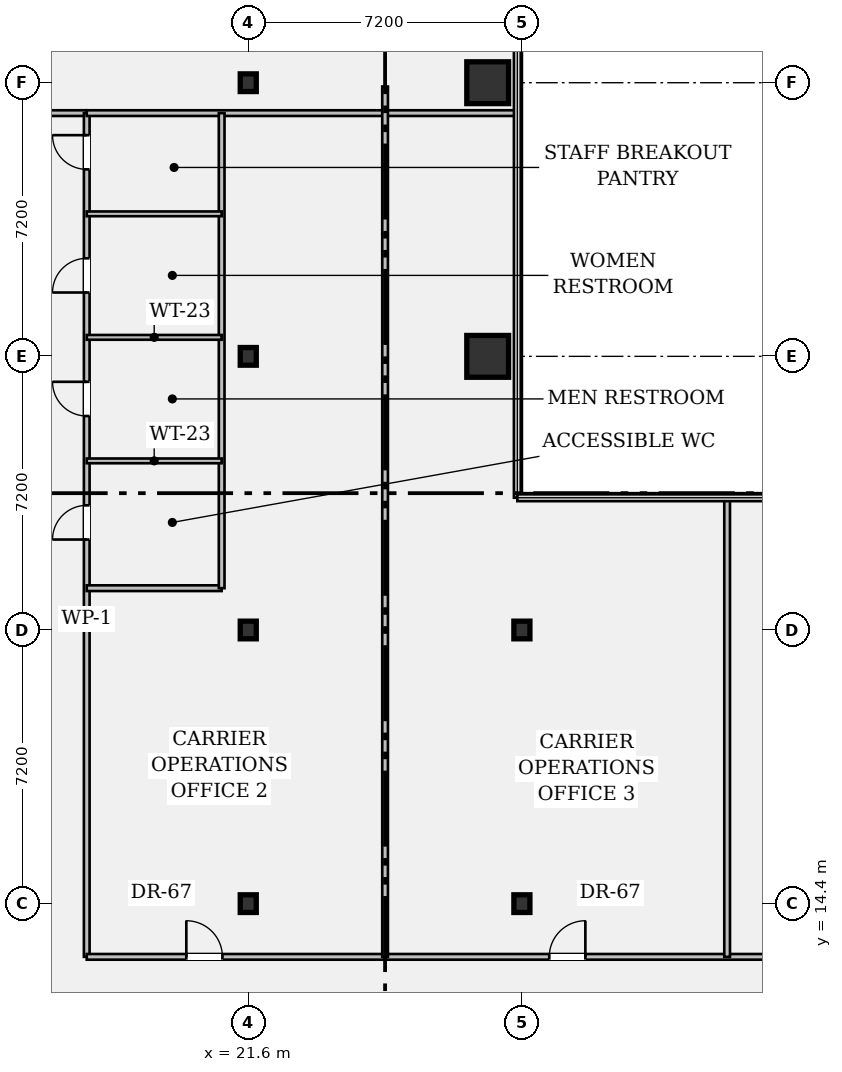
"""IFC4 building model, lengths in metres.
Left out: names, types, materials, properties, quantities, classifications, styles, units other than length and angle.
Written with IfcOpenShell. Run it as: python <this file> out.ifc"""

import sys

from ifc_helpers import new_model, si_unit, direction, frame, frame_2d, origin, origin_2d, place, context, subcontext, project, spatial, rectangle, hollow_rectangle, i_section, extrude, element, fill, save


model = new_model("IFC4")
c1 = context("Model", 3, precision=1e-05, world=origin(), true_north=direction((0.0, 1.0)))
c2 = subcontext(c1, "Body", "Model", "MODEL_VIEW")
j1 = project(units=[si_unit("LENGTHUNIT", "METRE"), si_unit("PLANEANGLEUNIT", "RADIAN")], contexts=[c1])
p1 = place(None, origin())
s1 = spatial("IfcSite", under=j1, at=p1, CompositionType="ELEMENT")
p2 = place(p1, origin())
s2 = spatial("IfcBuilding", under=s1, at=p2, CompositionType="ELEMENT")
p3 = place(p2, frame((0.0, 0.0, 35.0)))
s3 = spatial("IfcBuildingStorey", under=s2, at=p3, CompositionType="ELEMENT", Elevation=35.0)
for number, where, z_axis, x_axis in (
    (1, (21.6, 14.4, 0.0), (0.0, 0.0, 1.0), (1.0, 0.0, 0.0)),
    (2, (21.6, 21.6, 0.0), (0.0, 0.0, 1.0), (1.0, 0.0, 0.0)),
    (3, (21.6, 28.8, 0.0), (0.0, 0.0, 1.0), (1.0, 0.0, 0.0)),
    (4, (21.6, 36.0, 0.0), (0.0, 0.0, 1.0), (1.0, 0.0, 0.0)),
):
    element("IfcColumn", number, at=place(p3, frame(where, z_axis=z_axis, x_axis=x_axis)), inside=s3, PredefinedType="COLUMN", context=c2, shape_type="SweptSolid", body=[
        extrude(i_section(OverallWidth=0.422, OverallDepth=0.465, WebThickness=0.045, FlangeThickness=0.073, FilletRadius=0.018, at=origin_2d()), origin(), (0.0, 0.0, 1.0), 3.57),
    ])
for number, where, z_axis, x_axis in (
    (5, (27.9, 28.8, 0.0), (0.0, 0.0, 1.0), (1.0, 0.0, 0.0)),
    (6, (27.9, 36.0, 0.0), (0.0, 0.0, 1.0), (1.0, 0.0, 0.0)),
):
    element("IfcColumn", number, at=place(p3, frame(where, z_axis=z_axis, x_axis=x_axis)), inside=s3, PredefinedType="COLUMN", context=c2, shape_type="SweptSolid", body=[
        extrude(hollow_rectangle(XDim=1.1, YDim=1.1, WallThickness=0.07, at=origin_2d()), origin(), (0.0, 0.0, 1.0), 3.57),
    ])
for number, where, z_axis, x_axis in (
    (7, (28.8, 14.4, 0.0), (0.0, 0.0, 1.0), (1.0, 0.0, 0.0)),
    (8, (28.8, 21.6, 0.0), (0.0, 0.0, 1.0), (1.0, 0.0, 0.0)),
):
    element("IfcColumn", number, at=place(p3, frame(where, z_axis=z_axis, x_axis=x_axis)), inside=s3, PredefinedType="COLUMN", context=c2, shape_type="SweptSolid", body=[
        extrude(i_section(OverallWidth=0.422, OverallDepth=0.465, WebThickness=0.045, FlangeThickness=0.073, FilletRadius=0.018, at=origin_2d()), origin(), (0.0, 0.0, 1.0), 3.57),
    ])
p4 = place(p3, frame((14.4, 35.2, 0.0), z_axis=(0.0, 0.0, 1.0), x_axis=(1.0, 0.0, 0.0)))
e9 = element("IfcWall", 9, at=p4, inside=s3, PredefinedType="PARTITIONING", context=c2, shape_type="SweptSolid", body=[
    extrude(rectangle(XDim=2.95, YDim=0.15, at=frame_2d((1.475, 0.0))), origin(), (0.0, 0.0, 1.0), 2.628),
])
p5 = place(p4, frame((0.95, 0.0, 0.0)))
e10 = element("IfcOpeningElement", 10, at=p5, cuts=e9, PredefinedType="OPENING", context=c2, shape_type="SweptSolid", body=[
    extrude(rectangle(XDim=1.0, YDim=2.15, at=frame_2d((0.5, 1.075))), frame((0.0, 0.087, 0.0), z_axis=(0.0, -1.0, 0.0), x_axis=(1.0, 0.0, 0.0)), (0.0, 0.0, 1.0), 0.174),
])
p6 = place(p3, frame((17.35, 13.0, 0.0), z_axis=(0.0, 0.0, 1.0), x_axis=(0.0, 1.0, 0.0)))
e11 = element("IfcWall", 11, at=p6, inside=s3, PredefinedType="PARTITIONING", context=c2, shape_type="SweptSolid", body=[
    extrude(rectangle(XDim=22.2, YDim=0.15, at=frame_2d((11.1, 0.0))), origin(), (0.0, 0.0, 1.0), 2.628),
])
p7 = place(p6, frame((10.98, 0.0, 0.0)))
e12 = element("IfcOpeningElement", 12, at=p7, cuts=e11, PredefinedType="OPENING", context=c2, shape_type="SweptSolid", body=[
    extrude(rectangle(XDim=0.9, YDim=2.15, at=frame_2d((0.45, 1.075))), frame((0.0, 0.087, 0.0), z_axis=(0.0, -1.0, 0.0), x_axis=(1.0, 0.0, 0.0)), (0.0, 0.0, 1.0), 0.174),
])
p8 = place(p6, frame((14.23, 0.0, 0.0)))
e13 = element("IfcOpeningElement", 13, at=p8, cuts=e11, PredefinedType="OPENING", context=c2, shape_type="SweptSolid", body=[
    extrude(rectangle(XDim=0.9, YDim=2.15, at=frame_2d((0.45, 1.075))), frame((0.0, 0.087, 0.0), z_axis=(0.0, -1.0, 0.0), x_axis=(1.0, 0.0, 0.0)), (0.0, 0.0, 1.0), 0.174),
])
p9 = place(p6, frame((17.48, 0.0, 0.0)))
e14 = element("IfcOpeningElement", 14, at=p9, cuts=e11, PredefinedType="OPENING", context=c2, shape_type="SweptSolid", body=[
    extrude(rectangle(XDim=0.9, YDim=2.15, at=frame_2d((0.45, 1.075))), frame((0.0, 0.087, 0.0), z_axis=(0.0, -1.0, 0.0), x_axis=(1.0, 0.0, 0.0)), (0.0, 0.0, 1.0), 0.174),
])
p10 = place(p6, frame((20.72, 0.0, 0.0)))
e15 = element("IfcOpeningElement", 15, at=p10, cuts=e11, PredefinedType="OPENING", context=c2, shape_type="SweptSolid", body=[
    extrude(rectangle(XDim=0.9, YDim=2.15, at=frame_2d((0.45, 1.075))), frame((0.0, 0.087, 0.0), z_axis=(0.0, -1.0, 0.0), x_axis=(1.0, 0.0, 0.0)), (0.0, 0.0, 1.0), 0.174),
])
p11 = place(p3, frame((17.35, 13.0, 0.0), z_axis=(0.0, 0.0, 1.0), x_axis=(1.0, 0.0, 0.0)))
e16 = element("IfcWall", 16, at=p11, inside=s3, PredefinedType="PARTITIONING", context=c2, shape_type="SweptSolid", body=[
    extrude(rectangle(XDim=25.25, YDim=0.15, at=frame_2d((12.625, 0.0))), origin(), (0.0, 0.0, 1.0), 2.628),
])
p12 = place(p11, frame((2.62, 0.0, 0.0)))
e17 = element("IfcOpeningElement", 17, at=p12, cuts=e16, PredefinedType="OPENING", context=c2, shape_type="SweptSolid", body=[
    extrude(rectangle(XDim=0.95, YDim=2.15, at=frame_2d((0.475, 1.075))), frame((0.0, 0.087, 0.0), z_axis=(0.0, -1.0, 0.0), x_axis=(1.0, 0.0, 0.0)), (0.0, 0.0, 1.0), 0.174),
])
p13 = place(p11, frame((12.17, 0.0, 0.0)))
e18 = element("IfcOpeningElement", 18, at=p13, cuts=e16, PredefinedType="OPENING", context=c2, shape_type="SweptSolid", body=[
    extrude(rectangle(XDim=0.95, YDim=2.15, at=frame_2d((0.475, 1.075))), frame((0.0, 0.087, 0.0), z_axis=(0.0, -1.0, 0.0), x_axis=(1.0, 0.0, 0.0)), (0.0, 0.0, 1.0), 0.174),
])
p14 = place(p11, frame((20.55, 0.0, 0.0)))
e19 = element("IfcOpeningElement", 19, at=p14, cuts=e16, PredefinedType="OPENING", context=c2, shape_type="SweptSolid", body=[
    extrude(rectangle(XDim=0.95, YDim=2.15, at=frame_2d((0.475, 1.075))), frame((0.0, 0.087, 0.0), z_axis=(0.0, -1.0, 0.0), x_axis=(1.0, 0.0, 0.0)), (0.0, 0.0, 1.0), 0.174),
])
p15 = place(p3, frame((17.35, 35.2, 0.0), z_axis=(0.0, 0.0, 1.0), x_axis=(1.0, 0.0, 0.0)))
e20 = element("IfcWall", 20, at=p15, inside=s3, PredefinedType="PARTITIONING", context=c2, shape_type="SweptSolid", body=[
    extrude(rectangle(XDim=11.33, YDim=0.15, at=frame_2d((5.665, 0.0))), origin(), (0.0, 0.0, 1.0), 2.628),
])
p16 = place(p3, frame((17.35, 22.7, 0.0), z_axis=(0.0, 0.0, 1.0), x_axis=(1.0, 0.0, 0.0)))
e21 = element("IfcWall", 21, at=p16, inside=s3, PredefinedType="PARTITIONING", context=c2, shape_type="SweptSolid", body=[
    extrude(rectangle(XDim=3.55, YDim=0.15, at=frame_2d((1.775, 0.0))), origin(), (0.0, 0.0, 1.0), 3.088),
])
p17 = place(p3, frame((20.9, 22.7, 0.0), z_axis=(0.0, 0.0, 1.0), x_axis=(0.0, 1.0, 0.0)))
e22 = element("IfcWall", 22, at=p17, inside=s3, PredefinedType="PARTITIONING", context=c2, shape_type="SweptSolid", body=[
    extrude(rectangle(XDim=12.5, YDim=0.15, at=frame_2d((6.25, 0.0))), origin(), (0.0, 0.0, 1.0), 2.628),
])
for number, where, z_axis, x_axis in (
    (23, (17.35, 26.05, 0.0), (0.0, 0.0, 1.0), (1.0, 0.0, 0.0)),
    (24, (17.35, 29.3, 0.0), (0.0, 0.0, 1.0), (1.0, 0.0, 0.0)),
    (25, (17.35, 32.55, 0.0), (0.0, 0.0, 1.0), (1.0, 0.0, 0.0)),
):
    element("IfcWall", number, at=place(p3, frame(where, z_axis=z_axis, x_axis=x_axis)), inside=s3, PredefinedType="PARTITIONING", context=c2, shape_type="SweptSolid", body=[
        extrude(rectangle(XDim=3.55, YDim=0.125, at=frame_2d((1.775, 0.0))), origin(), (0.0, 0.0, 1.0), 3.088),
    ])
p18 = place(p3, frame((25.2, 13.0, 0.0), z_axis=(0.0, 0.0, 1.0), x_axis=(0.0, 1.0, 0.0)))
e26 = element("IfcWall", 26, at=p18, inside=s3, PredefinedType="PARTITIONING", context=c2, shape_type="SweptSolid", body=[
    extrude(rectangle(XDim=22.9, YDim=0.15, at=frame_2d((11.45, 0.0))), origin(), (0.0, 0.0, 1.0), 2.628),
])
p19 = place(p3, frame((34.2, 13.0, 0.0), z_axis=(0.0, 0.0, 1.0), x_axis=(0.0, 1.0, 0.0)))
e27 = element("IfcWall", 27, at=p19, inside=s3, PredefinedType="PARTITIONING", context=c2, shape_type="SweptSolid", body=[
    extrude(rectangle(XDim=12.05, YDim=0.15, at=frame_2d((6.025, 0.0))), origin(), (0.0, 0.0, 1.0), 2.628),
])
p20 = place(p7, origin())
e28 = element("IfcDoor", 28, at=p20, inside=s3, OperationType="SINGLE_SWING_LEFT", PredefinedType="DOOR", context=c2, shape_type="SweptSolid", body=[
    extrude(rectangle(XDim=0.9, YDim=2.15, at=frame_2d((0.45, 1.075))), frame((0.0, 0.025, 0.0), z_axis=(0.0, -1.0, 0.0), x_axis=(1.0, 0.0, 0.0)), (0.0, 0.0, 1.0), 0.05),
])
fill(e12, e28)
p21 = place(p8, origin())
e29 = element("IfcDoor", 29, at=p21, inside=s3, OperationType="SINGLE_SWING_RIGHT", PredefinedType="DOOR", context=c2, shape_type="SweptSolid", body=[
    extrude(rectangle(XDim=0.9, YDim=2.15, at=frame_2d((0.45, 1.075))), frame((0.0, 0.025, 0.0), z_axis=(0.0, -1.0, 0.0), x_axis=(1.0, 0.0, 0.0)), (0.0, 0.0, 1.0), 0.05),
])
fill(e13, e29)
p22 = place(p9, origin())
e30 = element("IfcDoor", 30, at=p22, inside=s3, OperationType="SINGLE_SWING_LEFT", PredefinedType="DOOR", context=c2, shape_type="SweptSolid", body=[
    extrude(rectangle(XDim=0.9, YDim=2.15, at=frame_2d((0.45, 1.075))), frame((0.0, 0.025, 0.0), z_axis=(0.0, -1.0, 0.0), x_axis=(1.0, 0.0, 0.0)), (0.0, 0.0, 1.0), 0.05),
])
fill(e14, e30)
p23 = place(p10, origin())
e31 = element("IfcDoor", 31, at=p23, inside=s3, OperationType="SINGLE_SWING_RIGHT", PredefinedType="DOOR", context=c2, shape_type="SweptSolid", body=[
    extrude(rectangle(XDim=0.9, YDim=2.15, at=frame_2d((0.45, 1.075))), frame((0.0, 0.025, 0.0), z_axis=(0.0, -1.0, 0.0), x_axis=(1.0, 0.0, 0.0)), (0.0, 0.0, 1.0), 0.05),
])
fill(e15, e31)
p24 = place(p12, origin())
e32 = element("IfcDoor", 32, at=p24, inside=s3, OperationType="SINGLE_SWING_LEFT", PredefinedType="DOOR", context=c2, shape_type="SweptSolid", body=[
    extrude(rectangle(XDim=0.95, YDim=2.15, at=frame_2d((0.475, 1.075))), frame((0.0, 0.025, 0.0), z_axis=(0.0, -1.0, 0.0), x_axis=(1.0, 0.0, 0.0)), (0.0, 0.0, 1.0), 0.05),
])
fill(e17, e32)
p25 = place(p13, origin())
e33 = element("IfcDoor", 33, at=p25, inside=s3, OperationType="SINGLE_SWING_RIGHT", PredefinedType="DOOR", context=c2, shape_type="SweptSolid", body=[
    extrude(rectangle(XDim=0.95, YDim=2.15, at=frame_2d((0.475, 1.075))), frame((0.0, 0.025, 0.0), z_axis=(0.0, -1.0, 0.0), x_axis=(1.0, 0.0, 0.0)), (0.0, 0.0, 1.0), 0.05),
])
fill(e18, e33)
save(model, sys.argv[1])
